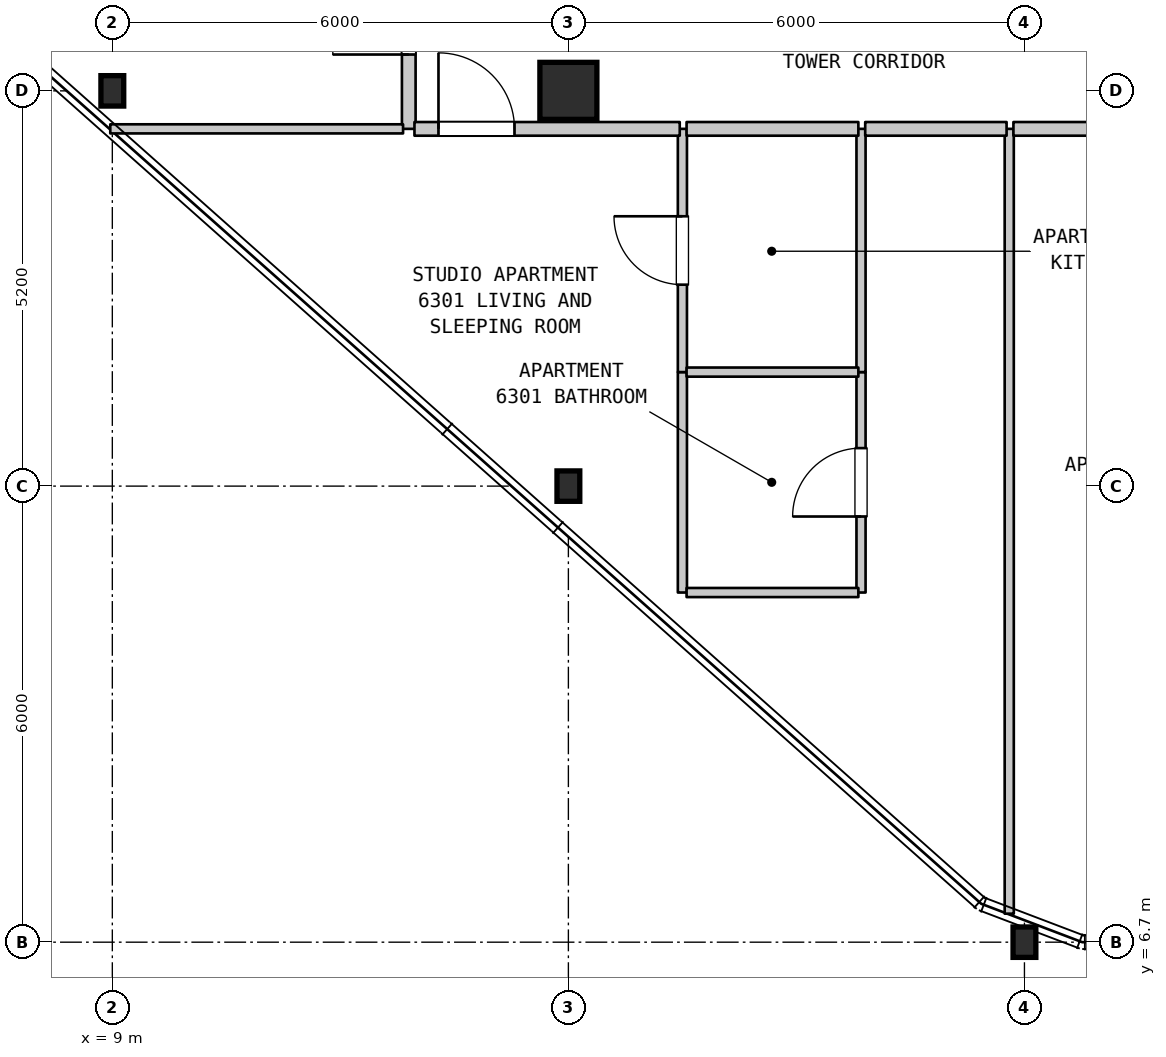
"""IFC4 building model, lengths in metres.
Left out: names, types, materials, properties, quantities, classifications, styles, units other than length and angle.
Written with IfcOpenShell. Run it as: python <this file> out.ifc"""

import sys

from ifc_helpers import new_model, si_unit, direction, frame, frame_2d, origin, origin_2d, place, context, subcontext, project, spatial, rectangle, i_section, extrude, element, fill, save


model = new_model("IFC4")
c1 = context("Model", 3, precision=1e-05, world=origin(), true_north=direction((0.0, 1.0)))
c2 = subcontext(c1, "Body", "Model", "MODEL_VIEW")
j1 = project(units=[si_unit("LENGTHUNIT", "METRE"), si_unit("PLANEANGLEUNIT", "RADIAN")], contexts=[c1])
p1 = place(None, origin())
s1 = spatial("IfcSite", under=j1, at=p1, CompositionType="ELEMENT")
p2 = place(p1, origin())
s2 = spatial("IfcBuilding", under=s1, at=p2, CompositionType="ELEMENT")
p3 = place(p2, frame((0.0, 0.0, 254.7)))
s3 = spatial("IfcBuildingStorey", under=s2, at=p3, CompositionType="ELEMENT", Elevation=254.7)
for number, where, z_axis, x_axis in (
    (1, (9.0, 17.9, 0.0), (0.0, 0.0, 1.0), (1.0, 0.0, 0.0)),
    (2, (15.0, 12.7, 0.0), (0.0, 0.0, 1.0), (1.0, 0.0, 0.0)),
):
    element("IfcColumn", number, at=place(p3, frame(where, z_axis=z_axis, x_axis=x_axis)), inside=s3, PredefinedType="COLUMN", context=c2, shape_type="SweptSolid", body=[
        extrude(i_section(OverallWidth=0.3, OverallDepth=0.4, WebThickness=0.013, FlangeThickness=0.024, FilletRadius=0.027, at=origin_2d()), origin(), (0.0, 0.0, 1.0), 3.7),
    ])
p4 = place(p3, frame((15.0, 17.9, 0.0), z_axis=(0.0, 0.0, 1.0), x_axis=(1.0, 0.0, 0.0)))
e3 = element("IfcColumn", 3, at=p4, inside=s3, PredefinedType="COLUMN", context=c2, shape_type="SweptSolid", body=[
    extrude(rectangle(XDim=0.75, YDim=0.75, at=origin_2d()), origin(), (0.0, 0.0, 1.0), 3.7),
])
p5 = place(p3, frame((21.0, 6.7, 0.0), z_axis=(0.0, 0.0, 1.0), x_axis=(1.0, 0.0, 0.0)))
e4 = element("IfcColumn", 4, at=p5, inside=s3, PredefinedType="COLUMN", context=c2, shape_type="SweptSolid", body=[
    extrude(i_section(OverallWidth=0.3, OverallDepth=0.4, WebThickness=0.013, FlangeThickness=0.024, FilletRadius=0.027, at=origin_2d()), origin(), (0.0, 0.0, 1.0), 3.7),
])
p6 = place(p3, frame((12.9, 17.4, 0.0), z_axis=(0.0, 0.0, 1.0), x_axis=(0.0, 1.0, 0.0)))
e5 = element("IfcWall", 5, at=p6, inside=s3, PredefinedType="STANDARD", context=c2, shape_type="SweptSolid", body=[
    extrude(rectangle(XDim=3.1, YDim=0.18, at=frame_2d((1.55, 0.0))), origin(), (0.0, 0.0, 1.0), 3.39),
])
p7 = place(p6, frame((0.978, 0.0, 0.0)))
e6 = element("IfcOpeningElement", 6, at=p7, cuts=e5, PredefinedType="OPENING", context=c2, shape_type="SweptSolid", body=[
    extrude(rectangle(XDim=1.0, YDim=2.15, at=frame_2d((0.5, 1.075))), frame((0.0, 0.1, 0.0), z_axis=(0.0, -1.0, 0.0), x_axis=(1.0, 0.0, 0.0)), (0.0, 0.0, 1.0), 0.2),
])
p8 = place(p3, frame((16.5, 11.3, 0.0), z_axis=(0.0, 0.0, 1.0), x_axis=(0.0, 1.0, 0.0)))
e7 = element("IfcWall", 7, at=p8, inside=s3, PredefinedType="PARTITIONING", context=c2, shape_type="SweptSolid", body=[
    extrude(rectangle(XDim=2.9, YDim=0.12, at=frame_2d((1.45, 0.0))), origin(), (0.0, 0.0, 1.0), 3.39),
])
p9 = place(p3, frame((16.5, 14.2, 0.0), z_axis=(0.0, 0.0, 1.0), x_axis=(0.0, 1.0, 0.0)))
e8 = element("IfcWall", 8, at=p9, inside=s3, PredefinedType="PARTITIONING", context=c2, shape_type="SweptSolid", body=[
    extrude(rectangle(XDim=3.2, YDim=0.12, at=frame_2d((1.6, 0.0))), origin(), (0.0, 0.0, 1.0), 3.39),
])
p10 = place(p9, frame((1.15, 0.0, 0.0)))
e9 = element("IfcOpeningElement", 9, at=p10, cuts=e8, PredefinedType="OPENING", context=c2, shape_type="SweptSolid", body=[
    extrude(rectangle(XDim=0.9, YDim=2.15, at=frame_2d((0.45, 1.075))), frame((0.0, 0.07, 0.0), z_axis=(0.0, -1.0, 0.0), x_axis=(1.0, 0.0, 0.0)), (0.0, 0.0, 1.0), 0.14),
])
p11 = place(p3, frame((18.85, 11.3, 0.0), z_axis=(0.0, 0.0, 1.0), x_axis=(0.0, 1.0, 0.0)))
e10 = element("IfcWall", 10, at=p11, inside=s3, PredefinedType="PARTITIONING", context=c2, shape_type="SweptSolid", body=[
    extrude(rectangle(XDim=2.9, YDim=0.12, at=frame_2d((1.45, 0.0))), origin(), (0.0, 0.0, 1.0), 3.39),
])
p12 = place(p11, frame((1.0, 0.0, 0.0)))
e11 = element("IfcOpeningElement", 11, at=p12, cuts=e10, PredefinedType="OPENING", context=c2, shape_type="SweptSolid", body=[
    extrude(rectangle(XDim=0.9, YDim=2.1, at=frame_2d((0.45, 1.05))), frame((0.0, 0.07, 0.0), z_axis=(0.0, -1.0, 0.0), x_axis=(1.0, 0.0, 0.0)), (0.0, 0.0, 1.0), 0.14),
])
p13 = place(p3, frame((18.85, 14.2, 0.0), z_axis=(0.0, 0.0, 1.0), x_axis=(0.0, 1.0, 0.0)))
e12 = element("IfcWall", 12, at=p13, inside=s3, PredefinedType="PARTITIONING", context=c2, shape_type="SweptSolid", body=[
    extrude(rectangle(XDim=3.2, YDim=0.12, at=frame_2d((1.6, 0.0))), origin(), (0.0, 0.0, 1.0), 3.39),
])
p14 = place(p3, frame((20.8, 7.075, 0.0), z_axis=(0.0, 0.0, 1.0), x_axis=(0.0, 1.0, 0.0)))
e13 = element("IfcWall", 13, at=p14, inside=s3, PredefinedType="PARTITIONING", context=c2, shape_type="SweptSolid", body=[
    extrude(rectangle(XDim=10.325, YDim=0.12, at=frame_2d((5.163, 0.0))), origin(), (0.0, 0.0, 1.0), 3.39),
])
for number, where, z_axis, x_axis in (
    (14, (16.555, 11.3, 0.0), (0.0, 0.0, 1.0), (1.0, 0.0, 0.0)),
    (15, (16.555, 14.2, 0.0), (0.0, 0.0, 1.0), (1.0, 0.0, 0.0)),
):
    element("IfcWall", number, at=place(p3, frame(where, z_axis=z_axis, x_axis=x_axis)), inside=s3, PredefinedType="PARTITIONING", context=c2, shape_type="SweptSolid", body=[
        extrude(rectangle(XDim=2.26, YDim=0.12, at=frame_2d((1.13, 0.0))), origin(), (0.0, 0.0, 1.0), 3.39),
    ])
p15 = place(p3, frame((8.973, 17.4, 0.0), z_axis=(0.0, 0.0, 1.0), x_axis=(1.0, 0.0, 0.0)))
e16 = element("IfcWall", 16, at=p15, inside=s3, PredefinedType="PARTITIONING", context=c2, shape_type="SweptSolid", body=[
    extrude(rectangle(XDim=3.852, YDim=0.12, at=frame_2d((1.926, 0.0))), origin(), (0.0, 0.0, 1.0), 3.39),
])
p16 = place(p3, frame((12.975, 17.4, 0.0), z_axis=(0.0, 0.0, 1.0), x_axis=(1.0, 0.0, 0.0)))
e17 = element("IfcWall", 17, at=p16, inside=s3, PredefinedType="STANDARD", context=c2, shape_type="SweptSolid", body=[
    extrude(rectangle(XDim=3.49, YDim=0.18, at=frame_2d((1.745, 0.0))), origin(), (0.0, 0.0, 1.0), 3.39),
])
p17 = place(p16, frame((0.316, 0.0, 0.0)))
e18 = element("IfcOpeningElement", 18, at=p17, cuts=e17, PredefinedType="OPENING", context=c2, shape_type="SweptSolid", body=[
    extrude(rectangle(XDim=1.0, YDim=2.15, at=frame_2d((0.5, 1.075))), frame((0.0, 0.1, 0.0), z_axis=(0.0, -1.0, 0.0), x_axis=(1.0, 0.0, 0.0)), (0.0, 0.0, 1.0), 0.2),
])
p18 = place(p3, frame((16.555, 17.4, 0.0), z_axis=(0.0, 0.0, 1.0), x_axis=(1.0, 0.0, 0.0)))
e19 = element("IfcWall", 19, at=p18, inside=s3, PredefinedType="STANDARD", context=c2, shape_type="SweptSolid", body=[
    extrude(rectangle(XDim=2.26, YDim=0.18, at=frame_2d((1.13, 0.0))), origin(), (0.0, 0.0, 1.0), 3.39),
])
p19 = place(p3, frame((18.905, 17.4, 0.0), z_axis=(0.0, 0.0, 1.0), x_axis=(1.0, 0.0, 0.0)))
e20 = element("IfcWall", 20, at=p19, inside=s3, PredefinedType="STANDARD", context=c2, shape_type="SweptSolid", body=[
    extrude(rectangle(XDim=1.86, YDim=0.18, at=frame_2d((0.93, 0.0))), origin(), (0.0, 0.0, 1.0), 3.39),
])
p20 = place(p3, frame((20.855, 17.4, 0.0), z_axis=(0.0, 0.0, 1.0), x_axis=(1.0, 0.0, 0.0)))
e21 = element("IfcWall", 21, at=p20, inside=s3, PredefinedType="STANDARD", context=c2, shape_type="SweptSolid", body=[
    extrude(rectangle(XDim=4.42, YDim=0.18, at=frame_2d((2.21, 0.0))), origin(), (0.0, 0.0, 1.0), 3.39),
])
p21 = place(p20, frame((1.638, 0.0, 0.0)))
e22 = element("IfcOpeningElement", 22, at=p21, cuts=e21, PredefinedType="OPENING", context=c2, shape_type="SweptSolid", body=[
    extrude(rectangle(XDim=1.0, YDim=2.15, at=frame_2d((0.5, 1.075))), frame((0.0, 0.1, 0.0), z_axis=(0.0, -1.0, 0.0), x_axis=(1.0, 0.0, 0.0)), (0.0, 0.0, 1.0), 0.2),
])
p22 = place(p7, origin())
e23 = element("IfcDoor", 23, at=p22, inside=s3, OperationType="SINGLE_SWING_LEFT", PredefinedType="DOOR", context=c2, shape_type="SweptSolid", body=[
    extrude(rectangle(XDim=1.0, YDim=2.15, at=frame_2d((0.5, 1.075))), frame((0.0, 0.025, 0.0), z_axis=(0.0, -1.0, 0.0), x_axis=(1.0, 0.0, 0.0)), (0.0, 0.0, 1.0), 0.05),
])
fill(e6, e23)
p23 = place(p10, origin())
e24 = element("IfcDoor", 24, at=p23, inside=s3, OperationType="SINGLE_SWING_RIGHT", PredefinedType="DOOR", context=c2, shape_type="SweptSolid", body=[
    extrude(rectangle(XDim=0.9, YDim=2.15, at=frame_2d((0.45, 1.075))), frame((0.0, 0.025, 0.0), z_axis=(0.0, -1.0, 0.0), x_axis=(1.0, 0.0, 0.0)), (0.0, 0.0, 1.0), 0.05),
])
fill(e9, e24)
p24 = place(p12, origin())
e25 = element("IfcDoor", 25, at=p24, inside=s3, OperationType="SINGLE_SWING_LEFT", PredefinedType="DOOR", context=c2, shape_type="SweptSolid", body=[
    extrude(rectangle(XDim=0.9, YDim=2.1, at=frame_2d((0.45, 1.05))), frame((0.0, 0.025, 0.0), z_axis=(0.0, -1.0, 0.0), x_axis=(1.0, 0.0, 0.0)), (0.0, 0.0, 1.0), 0.05),
])
fill(e11, e25)
p25 = place(p17, origin())
e26 = element("IfcDoor", 26, at=p25, inside=s3, OperationType="SINGLE_SWING_LEFT", PredefinedType="DOOR", context=c2, shape_type="SweptSolid", body=[
    extrude(rectangle(XDim=1.0, YDim=2.15, at=frame_2d((0.5, 1.075))), frame((0.0, 0.025, 0.0), z_axis=(0.0, -1.0, 0.0), x_axis=(1.0, 0.0, 0.0)), (0.0, 0.0, 1.0), 0.05),
])
fill(e18, e26)
save(model, sys.argv[1])
